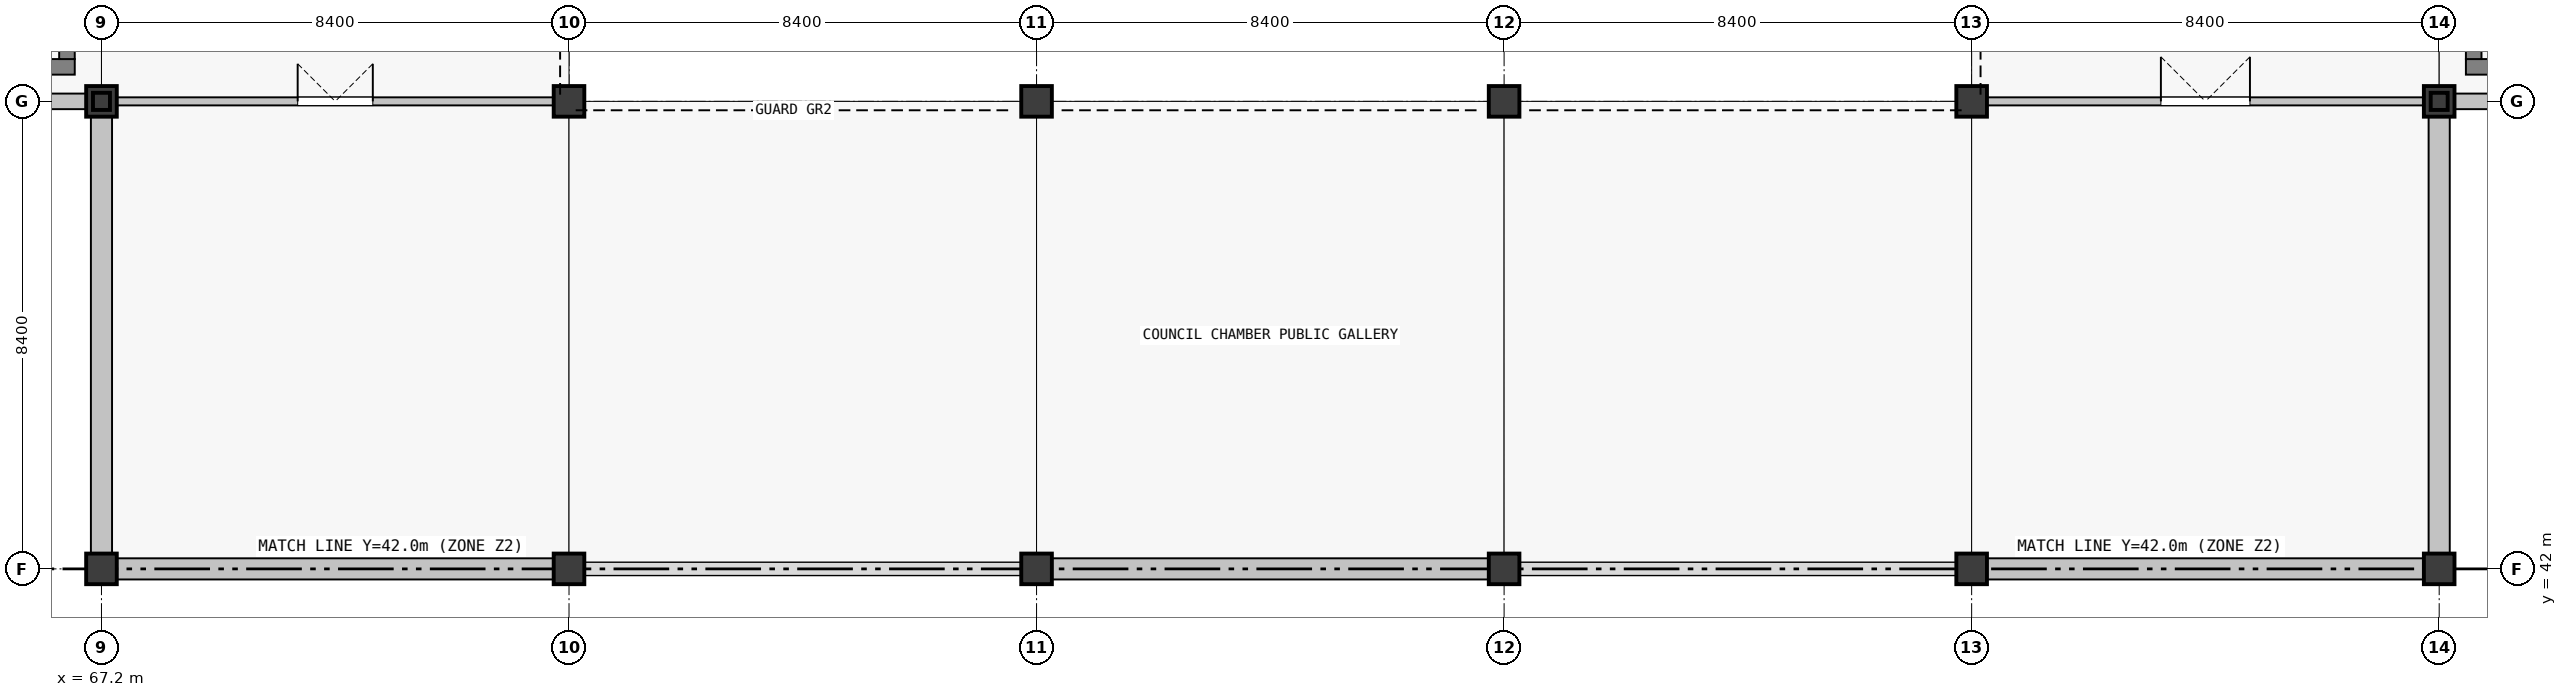
"""IFC4 building model, lengths in metres.
Left out: names, types, materials, properties, quantities, classifications, styles, units other than length and angle.
Written with IfcOpenShell. Run it as: python <this file> out.ifc"""

import sys

from ifc_helpers import new_model, si_unit, direction, frame, frame_2d, origin, origin_2d, place, context, subcontext, project, spatial, rectangle, i_section, extrude, element, fill, save


model = new_model("IFC4")
c1 = context("Model", 3, precision=1e-05, world=origin(), true_north=direction((0.0, 1.0)))
c2 = subcontext(c1, "Body", "Model", "MODEL_VIEW")
j1 = project(units=[si_unit("LENGTHUNIT", "METRE"), si_unit("PLANEANGLEUNIT", "RADIAN")], contexts=[c1])
p1 = place(None, origin())
s1 = spatial("IfcSite", under=j1, at=p1, CompositionType="ELEMENT")
p2 = place(p1, origin())
s2 = spatial("IfcBuilding", under=s1, at=p2, CompositionType="ELEMENT")
p3 = place(p2, frame((0.0, 0.0, 14.76)))
s3 = spatial("IfcBuildingStorey", under=s2, at=p3, CompositionType="ELEMENT", Elevation=14.76)
for number, where, z_axis, x_axis in (
    (1, (67.2, 42.0, 0.0), (0.0, 0.0, 1.0), (1.0, 0.0, 0.0)),
    (2, (67.2, 50.4, 0.0), (0.0, 0.0, 1.0), (1.0, 0.0, 0.0)),
    (3, (75.6, 42.0, 0.0), (0.0, 0.0, 1.0), (1.0, 0.0, 0.0)),
    (4, (75.6, 50.4, 0.0), (0.0, 0.0, 1.0), (1.0, 0.0, 0.0)),
    (5, (84.0, 42.0, 0.0), (0.0, 0.0, 1.0), (1.0, 0.0, 0.0)),
    (6, (84.0, 50.4, 0.0), (0.0, 0.0, 1.0), (1.0, 0.0, 0.0)),
    (7, (92.4, 42.0, 0.0), (0.0, 0.0, 1.0), (1.0, 0.0, 0.0)),
    (8, (92.4, 50.4, 0.0), (0.0, 0.0, 1.0), (1.0, 0.0, 0.0)),
    (9, (100.8, 42.0, 0.0), (0.0, 0.0, 1.0), (1.0, 0.0, 0.0)),
    (10, (100.8, 50.4, 0.0), (0.0, 0.0, 1.0), (1.0, 0.0, 0.0)),
    (11, (109.2, 42.0, 0.0), (0.0, 0.0, 1.0), (1.0, 0.0, 0.0)),
    (12, (109.2, 50.4, 0.0), (0.0, 0.0, 1.0), (1.0, 0.0, 0.0)),
):
    element("IfcColumn", number, at=place(p3, frame(where, z_axis=z_axis, x_axis=x_axis)), inside=s3, PredefinedType="COLUMN", context=c2, shape_type="SweptSolid", body=[
        extrude(rectangle(XDim=0.55, YDim=0.55, at=origin_2d()), origin(), (0.0, 0.0, 1.0), 4.14),
    ])
for number, where, z_axis, x_axis in (
    (13, (67.2, 50.4, 4.14), (0.0, 0.0, 1.0), (1.0, 0.0, 0.0)),
    (14, (109.2, 50.4, 4.14), (0.0, 0.0, 1.0), (1.0, 0.0, 0.0)),
):
    element("IfcColumn", number, at=place(p3, frame(where, z_axis=z_axis, x_axis=x_axis)), inside=s3, PredefinedType="COLUMN", context=c2, shape_type="SweptSolid", body=[
        extrude(i_section(OverallWidth=0.305, OverallDepth=0.308, WebThickness=0.01, FlangeThickness=0.015, FilletRadius=0.017, at=origin_2d()), origin(), (0.0, 0.0, 1.0), 1.709),
    ])
p4 = place(p3, frame((66.924, 50.4, 0.0), z_axis=(0.0, 0.0, 1.0), x_axis=(-1.0, 0.0, 0.0)))
e15 = element("IfcWall", 15, at=p4, inside=s3, PredefinedType="SOLIDWALL", context=c2, shape_type="SweptSolid", body=[
    extrude(rectangle(XDim=7.848, YDim=0.28, at=frame_2d((3.924, 0.0))), origin(), (0.0, 0.0, 1.0), 3.37),
])
p5 = place(p3, frame((75.324, 42.0, 0.0), z_axis=(0.0, 0.0, 1.0), x_axis=(-1.0, 0.0, 0.0)))
e16 = element("IfcWall", 16, at=p5, inside=s3, PredefinedType="SOLIDWALL", context=c2, shape_type="SweptSolid", body=[
    extrude(rectangle(XDim=7.848, YDim=0.38, at=frame_2d((3.924, 0.0))), origin(), (0.0, 0.0, 1.0), 2.52),
])
for number, where, z_axis, x_axis in (
    (17, (67.2, 42.276, 0.0), (0.0, 0.0, 1.0), (0.0, 1.0, 0.0)),
    (18, (92.124, 42.0, 0.0), (0.0, 0.0, 1.0), (-1.0, 0.0, 0.0)),
    (19, (108.924, 42.0, 0.0), (0.0, 0.0, 1.0), (-1.0, 0.0, 0.0)),
    (20, (109.2, 50.124, 0.0), (0.0, 0.0, 1.0), (0.0, -1.0, 0.0)),
):
    element("IfcWall", number, at=place(p3, frame(where, z_axis=z_axis, x_axis=x_axis)), inside=s3, PredefinedType="SOLIDWALL", context=c2, shape_type="SweptSolid", body=[
        extrude(rectangle(XDim=7.848, YDim=0.38, at=frame_2d((3.924, 0.0))), origin(), (0.0, 0.0, 1.0), 2.52),
    ])
p6 = place(p3, frame((117.324, 50.4, 0.0), z_axis=(0.0, 0.0, 1.0), x_axis=(-1.0, 0.0, 0.0)))
e21 = element("IfcWall", 21, at=p6, inside=s3, PredefinedType="SOLIDWALL", context=c2, shape_type="SweptSolid", body=[
    extrude(rectangle(XDim=7.848, YDim=0.28, at=frame_2d((3.924, 0.0))), origin(), (0.0, 0.0, 1.0), 3.37),
])
p7 = place(p3, frame((66.72, 51.02, 0.0), z_axis=(0.0, 0.0, 1.0), x_axis=(-1.0, 0.0, 0.0)))
e22 = element("IfcWall", 22, at=p7, inside=s3, PredefinedType="SHEAR", context=c2, shape_type="SweptSolid", body=[
    extrude(rectangle(XDim=7.44, YDim=0.28, at=frame_2d((3.72, 0.0))), origin(), (0.0, 0.0, 1.0), 4.07),
])
p8 = place(p3, frame((66.58, 58.04, 0.0), z_axis=(0.0, 0.0, 1.0), x_axis=(0.0, -1.0, 0.0)))
e23 = element("IfcWall", 23, at=p8, inside=s3, PredefinedType="SHEAR", context=c2, shape_type="SweptSolid", body=[
    extrude(rectangle(XDim=6.88, YDim=0.28, at=frame_2d((3.44, 0.0))), origin(), (0.0, 0.0, 1.0), 4.07),
])
p9 = place(p8, frame((3.99, 0.0, 0.0)))
e24 = element("IfcOpeningElement", 24, at=p9, cuts=e23, PredefinedType="OPENING", context=c2, shape_type="SweptSolid", body=[
    extrude(rectangle(XDim=1.5, YDim=2.15, at=frame_2d((0.75, 1.075))), frame((0.0, 0.14, 0.0), z_axis=(0.0, -1.0, 0.0), x_axis=(1.0, 0.0, 0.0)), (0.0, 0.0, 1.0), 0.28),
])
p10 = place(p3, frame((117.12, 51.02, 0.0), z_axis=(0.0, 0.0, 1.0), x_axis=(-1.0, 0.0, 0.0)))
e25 = element("IfcWall", 25, at=p10, inside=s3, PredefinedType="SHEAR", context=c2, shape_type="SweptSolid", body=[
    extrude(rectangle(XDim=7.44, YDim=0.28, at=frame_2d((3.72, 0.0))), origin(), (0.0, 0.0, 1.0), 4.07),
])
p11 = place(p3, frame((109.82, 51.16, 0.0), z_axis=(0.0, 0.0, 1.0), x_axis=(0.0, 1.0, 0.0)))
e26 = element("IfcWall", 26, at=p11, inside=s3, PredefinedType="SHEAR", context=c2, shape_type="SweptSolid", body=[
    extrude(rectangle(XDim=6.88, YDim=0.28, at=frame_2d((3.44, 0.0))), origin(), (0.0, 0.0, 1.0), 4.07),
])
p12 = place(p3, frame((67.477, 50.4, 0.0), z_axis=(0.0, 0.0, 1.0), x_axis=(1.0, 0.0, 0.0)))
e27 = element("IfcWall", 27, at=p12, inside=s3, PredefinedType="PARTITIONING", context=c2, shape_type="SweptSolid", body=[
    extrude(rectangle(XDim=7.846, YDim=0.145, at=frame_2d((3.923, 0.0))), origin(), (0.0, 0.0, 1.0), 3.19),
])
p13 = place(p12, frame((3.248, 0.0, 0.0)))
e28 = element("IfcOpeningElement", 28, at=p13, cuts=e27, PredefinedType="OPENING", context=c2, shape_type="SweptSolid", body=[
    extrude(rectangle(XDim=1.35, YDim=2.2, at=frame_2d((0.675, 1.1))), frame((0.0, 0.073, 0.0), z_axis=(0.0, -1.0, 0.0), x_axis=(1.0, 0.0, 0.0)), (0.0, 0.0, 1.0), 0.145),
])
p14 = place(p3, frame((101.077, 50.4, 0.0), z_axis=(0.0, 0.0, 1.0), x_axis=(1.0, 0.0, 0.0)))
e29 = element("IfcWall", 29, at=p14, inside=s3, PredefinedType="PARTITIONING", context=c2, shape_type="SweptSolid", body=[
    extrude(rectangle(XDim=7.846, YDim=0.145, at=frame_2d((3.923, 0.0))), origin(), (0.0, 0.0, 1.0), 3.19),
])
p15 = place(p14, frame((3.123, 0.0, 0.0)))
e30 = element("IfcOpeningElement", 30, at=p15, cuts=e29, PredefinedType="OPENING", context=c2, shape_type="SweptSolid", body=[
    extrude(rectangle(XDim=1.6, YDim=2.3, at=frame_2d((0.8, 1.15))), frame((0.0, 0.073, 0.0), z_axis=(0.0, -1.0, 0.0), x_axis=(1.0, 0.0, 0.0)), (0.0, 0.0, 1.0), 0.145),
])
p16 = place(p13, origin())
e31 = element("IfcDoor", 31, at=p16, inside=s3, OperationType="DOUBLE_DOOR_SINGLE_SWING", PredefinedType="DOOR", context=c2, shape_type="SweptSolid", body=[
    extrude(rectangle(XDim=1.35, YDim=2.2, at=frame_2d((0.675, 1.1))), frame((0.0, 0.025, 0.0), z_axis=(0.0, -1.0, 0.0), x_axis=(1.0, 0.0, 0.0)), (0.0, 0.0, 1.0), 0.05),
])
fill(e28, e31)
p17 = place(p15, origin())
e32 = element("IfcDoor", 32, at=p17, inside=s3, OperationType="DOUBLE_DOOR_SINGLE_SWING", PredefinedType="DOOR", context=c2, shape_type="SweptSolid", body=[
    extrude(rectangle(XDim=1.6, YDim=2.3, at=frame_2d((0.8, 1.15))), frame((0.0, 0.025, 0.0), z_axis=(0.0, -1.0, 0.0), x_axis=(1.0, 0.0, 0.0)), (0.0, 0.0, 1.0), 0.05),
])
fill(e30, e32)
save(model, sys.argv[1])
